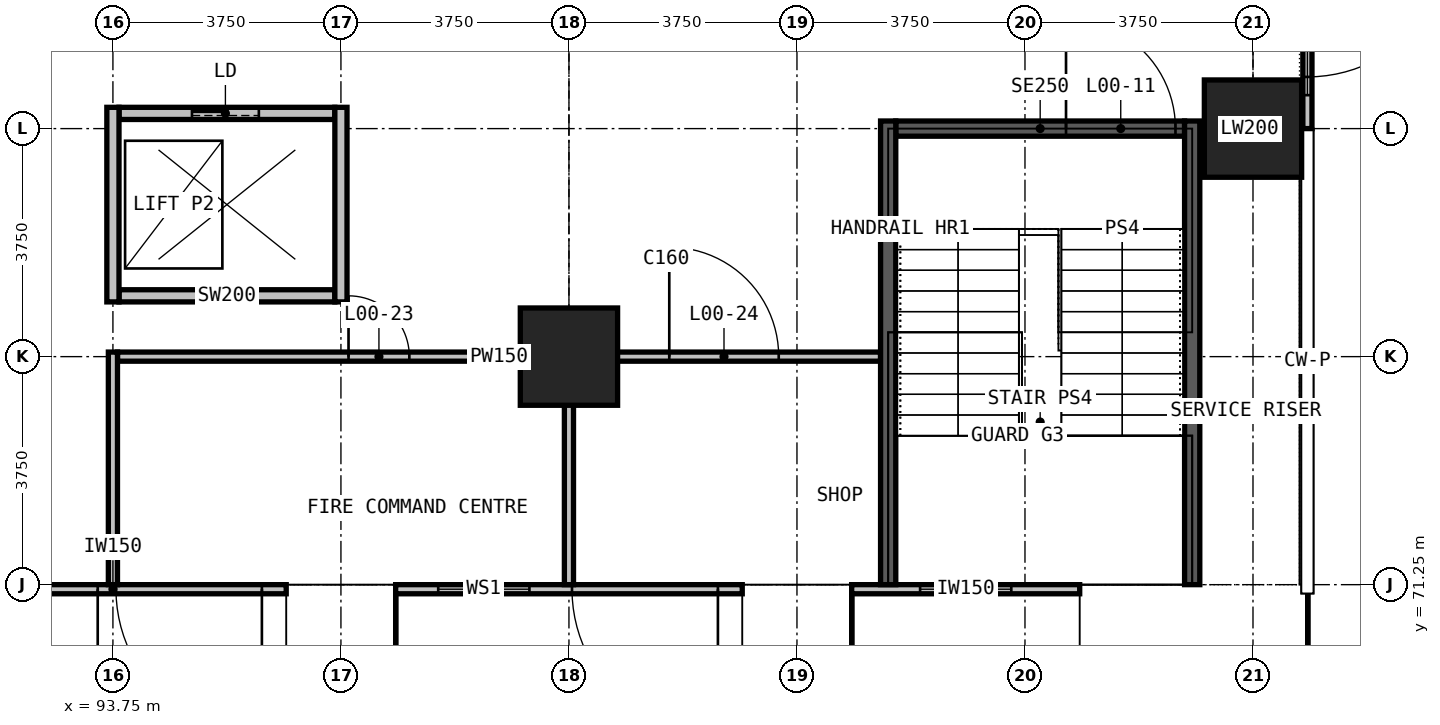
"""IFC4 building model, lengths in metres.
Left out: names, types, materials, properties, quantities, classifications, styles, units other than length and angle.
Written with IfcOpenShell. Run it as: python <this file> out.ifc"""

import sys

from ifc_helpers import new_model, si_unit, direction, frame, frame_2d, origin, origin_2d, place, context, subcontext, project, spatial, polyline, rectangle, outline, extrude, element, fill, save


model = new_model("IFC4")
c1 = context("Model", 3, precision=1e-05, world=origin(), true_north=direction((0.0, 1.0)))
c2 = subcontext(c1, "Body", "Model", "MODEL_VIEW")
j1 = project(units=[si_unit("LENGTHUNIT", "METRE"), si_unit("PLANEANGLEUNIT", "RADIAN")], contexts=[c1])
p1 = place(None, origin())
s1 = spatial("IfcSite", under=j1, at=p1, CompositionType="ELEMENT")
p2 = place(p1, origin())
s2 = spatial("IfcBuilding", under=s1, at=p2, CompositionType="ELEMENT")
p3 = place(p2, origin())
s3 = spatial("IfcBuildingStorey", under=s2, at=p3, CompositionType="ELEMENT", Elevation=0.0)
for number, where, z_axis, x_axis in (
    (1, (98.4, 71.25, 7.5), (1.0, 0.0, 0.0), (0.0, -1.0, 0.0)),
    (2, (105.9, 71.25, 7.5), (1.0, 0.0, 0.0), (0.0, -1.0, 0.0)),
):
    element("IfcWall", number, at=place(p3, frame(where, z_axis=z_axis, x_axis=x_axis)), inside=s3, PredefinedType="SHEAR", context=c2, shape_type="SweptSolid", body=[
        extrude(outline(polyline([(0.0, 0.0), (4.351, 0.0), (3.75, 1.5), (3.75, 7.5), (0.0, 7.5), (0.0, 0.0)])), origin(), (0.0, 0.0, -1.0), 1.8),
    ])
p4 = place(p3, frame((113.4, 71.25, 7.5), z_axis=(1.0, 0.0, 0.0), x_axis=(0.0, -1.0, 0.0)))
e3 = element("IfcWall", 3, at=p4, inside=s3, PredefinedType="SHEAR", context=c2, shape_type="SweptSolid", body=[
    extrude(outline(polyline([(0.0, 0.0), (4.351, 0.0), (3.75, 1.5), (3.75, 7.5), (0.0, 7.5), (0.0, 0.0)])), origin(), (0.0, 0.0, -1.0), 3.75),
])
for number, where, z_axis, x_axis in (
    (4, (101.25, 75.0, 0.0), (0.0, 0.0, 1.0), (1.0, 0.0, 0.0)),
    (5, (112.5, 78.75, 0.0), (0.0, 0.0, 1.0), (1.0, 0.0, 0.0)),
):
    element("IfcColumn", number, at=place(p3, frame(where, z_axis=z_axis, x_axis=x_axis)), inside=s3, PredefinedType="COLUMN", context=c2, shape_type="SweptSolid", body=[
        extrude(rectangle(XDim=1.6, YDim=1.6, at=origin_2d()), origin(), (0.0, 0.0, 1.0), 7.5),
    ])
p5 = place(p3, frame((113.395, 82.5, 0.0), z_axis=(0.0, 0.0, 1.0), x_axis=(0.0, -1.0, 0.0)))
e6 = element("IfcWall", 6, at=p5, inside=s3, PredefinedType="SOLIDWALL", context=c2, shape_type="SweptSolid", body=[
    extrude(rectangle(XDim=3.75, YDim=0.15, at=frame_2d((1.875, 0.0))), origin(), (0.0, 0.0, 1.0), 7.15),
])
p6 = place(p5, frame((0.5, 0.0, 0.0)))
e7 = element("IfcOpeningElement", 7, at=p6, cuts=e6, PredefinedType="OPENING", context=c2, shape_type="SweptSolid", body=[
    extrude(rectangle(XDim=2.4, YDim=2.7, at=frame_2d((1.2, 1.35))), frame((0.0, 0.085, 0.0), z_axis=(0.0, -1.0, 0.0), x_axis=(1.0, 0.0, 0.0)), (0.0, 0.0, 1.0), 0.17),
])
p7 = place(p5, frame((0.2, 0.0, 3.0)))
e8 = element("IfcOpeningElement", 8, at=p7, cuts=e6, PredefinedType="OPENING", context=c2, shape_type="SweptSolid", body=[
    extrude(rectangle(XDim=3.0, YDim=3.6, at=frame_2d((1.5, 1.8))), frame((0.0, 0.085, 0.0), z_axis=(0.0, -1.0, 0.0), x_axis=(1.0, 0.0, 0.0)), (0.0, 0.0, 1.0), 0.17),
])
p8 = place(p3, frame((96.6, 71.175, 0.0), z_axis=(0.0, 0.0, 1.0), x_axis=(-1.0, 0.0, 0.0)))
e9 = element("IfcWall", 9, at=p8, inside=s3, PredefinedType="SOLIDWALL", context=c2, shape_type="SweptSolid", body=[
    extrude(rectangle(XDim=5.7, YDim=0.15, at=frame_2d((2.85, 0.0))), origin(), (0.0, 0.0, 1.0), 7.15),
])
p9 = place(p8, frame((3.1, 0.0, 0.0)))
e10 = element("IfcOpeningElement", 10, at=p9, cuts=e9, PredefinedType="OPENING", context=c2, shape_type="SweptSolid", body=[
    extrude(rectangle(XDim=2.4, YDim=2.7, at=frame_2d((1.2, 1.35))), frame((0.0, 0.085, 0.0), z_axis=(0.0, -1.0, 0.0), x_axis=(1.0, 0.0, 0.0)), (0.0, 0.0, 1.0), 0.17),
])
p10 = place(p8, frame((0.4, 0.0, 0.0)))
e11 = element("IfcOpeningElement", 11, at=p10, cuts=e9, PredefinedType="OPENING", context=c2, shape_type="SweptSolid", body=[
    extrude(rectangle(XDim=2.4, YDim=2.7, at=frame_2d((1.2, 1.35))), frame((0.0, 0.085, 0.0), z_axis=(0.0, -1.0, 0.0), x_axis=(1.0, 0.0, 0.0)), (0.0, 0.0, 1.0), 0.17),
])
p11 = place(p3, frame((104.1, 71.175, 0.0), z_axis=(0.0, 0.0, 1.0), x_axis=(-1.0, 0.0, 0.0)))
e12 = element("IfcWall", 12, at=p11, inside=s3, PredefinedType="SOLIDWALL", context=c2, shape_type="SweptSolid", body=[
    extrude(rectangle(XDim=5.7, YDim=0.15, at=frame_2d((2.85, 0.0))), origin(), (0.0, 0.0, 1.0), 7.15),
])
p12 = place(p11, frame((0.4, 0.0, 0.0)))
e13 = element("IfcOpeningElement", 13, at=p12, cuts=e12, PredefinedType="OPENING", context=c2, shape_type="SweptSolid", body=[
    extrude(rectangle(XDim=2.4, YDim=2.7, at=frame_2d((1.2, 1.35))), frame((0.0, 0.085, 0.0), z_axis=(0.0, -1.0, 0.0), x_axis=(1.0, 0.0, 0.0)), (0.0, 0.0, 1.0), 0.17),
])
p13 = place(p11, frame((3.5, 0.0, 0.6)))
e14 = element("IfcOpeningElement", 14, at=p13, cuts=e12, PredefinedType="OPENING", context=c2, shape_type="SweptSolid", body=[
    extrude(rectangle(XDim=1.5, YDim=3.0, at=frame_2d((0.75, 1.5))), frame((0.0, 0.085, 0.0), z_axis=(0.0, -1.0, 0.0), x_axis=(1.0, 0.0, 0.0)), (0.0, 0.0, 1.0), 0.17),
])
p14 = place(p3, frame((109.65, 71.175, 0.0), z_axis=(0.0, 0.0, 1.0), x_axis=(-1.0, 0.0, 0.0)))
e15 = element("IfcWall", 15, at=p14, inside=s3, PredefinedType="SOLIDWALL", context=c2, shape_type="SweptSolid", body=[
    extrude(rectangle(XDim=3.75, YDim=0.15, at=frame_2d((1.875, 0.0))), origin(), (0.0, 0.0, 1.0), 7.15),
])
p15 = place(p14, frame((1.125, 0.0, 0.6)))
e16 = element("IfcOpeningElement", 16, at=p15, cuts=e15, PredefinedType="OPENING", context=c2, shape_type="SweptSolid", body=[
    extrude(rectangle(XDim=1.5, YDim=3.0, at=frame_2d((0.75, 1.5))), frame((0.0, 0.085, 0.0), z_axis=(0.0, -1.0, 0.0), x_axis=(1.0, 0.0, 0.0)), (0.0, 0.0, 1.0), 0.17),
])
p16 = place(p3, frame((111.625, 78.75, 0.0), z_axis=(0.0, 0.0, 1.0), x_axis=(1.0, 0.0, 0.0)))
e17 = element("IfcWall", 17, at=p16, inside=s3, PredefinedType="PARTITIONING", context=c2, shape_type="SweptSolid", body=[
    extrude(rectangle(XDim=1.64, YDim=0.2, at=frame_2d((0.82, 0.0))), origin(), (0.0, 0.0, 1.0), 7.15),
])
p17 = place(p3, frame((93.825, 75.0, 0.0), z_axis=(0.0, 0.0, 1.0), x_axis=(1.0, 0.0, 0.0)))
e18 = element("IfcWall", 18, at=p17, inside=s3, PredefinedType="PARTITIONING", context=c2, shape_type="SweptSolid", body=[
    extrude(rectangle(XDim=12.55, YDim=0.15, at=frame_2d((6.275, 0.0))), origin(), (0.0, 0.0, 1.0), 7.15),
])
p18 = place(p17, frame((3.8, 0.0, 0.0)))
e19 = element("IfcOpeningElement", 19, at=p18, cuts=e18, PredefinedType="OPENING", context=c2, shape_type="SweptSolid", body=[
    extrude(rectangle(XDim=1.0, YDim=2.2, at=frame_2d((0.5, 1.1))), frame((0.0, 0.085, 0.0), z_axis=(0.0, -1.0, 0.0), x_axis=(1.0, 0.0, 0.0)), (0.0, 0.0, 1.0), 0.17),
])
p19 = place(p17, frame((9.075, 0.0, 0.0)))
e20 = element("IfcOpeningElement", 20, at=p19, cuts=e18, PredefinedType="OPENING", context=c2, shape_type="SweptSolid", body=[
    extrude(rectangle(XDim=1.8, YDim=2.2, at=frame_2d((0.9, 1.1))), frame((0.0, 0.085, 0.0), z_axis=(0.0, -1.0, 0.0), x_axis=(1.0, 0.0, 0.0)), (0.0, 0.0, 1.0), 0.17),
])
p20 = place(p3, frame((93.75, 71.25, 0.0), z_axis=(0.0, 0.0, 1.0), x_axis=(0.0, 1.0, 0.0)))
e21 = element("IfcWall", 21, at=p20, inside=s3, PredefinedType="PARTITIONING", context=c2, shape_type="SweptSolid", body=[
    extrude(rectangle(XDim=3.825, YDim=0.15, at=frame_2d((1.913, 0.0))), origin(), (0.0, 0.0, 1.0), 7.15),
])
p21 = place(p3, frame((101.25, 71.25, 0.0), z_axis=(0.0, 0.0, 1.0), x_axis=(0.0, 1.0, 0.0)))
e22 = element("IfcWall", 22, at=p21, inside=s3, PredefinedType="PARTITIONING", context=c2, shape_type="SweptSolid", body=[
    extrude(rectangle(XDim=3.675, YDim=0.15, at=frame_2d((1.837, 0.0))), origin(), (0.0, 0.0, 1.0), 7.15),
])
p22 = place(p3, frame((93.85, 76.0, 0.0), z_axis=(0.0, 0.0, 1.0), x_axis=(1.0, 0.0, 0.0)))
e23 = element("IfcWall", 23, at=p22, inside=s3, PredefinedType="PARTITIONING", context=c2, shape_type="SweptSolid", body=[
    extrude(rectangle(XDim=3.55, YDim=0.2, at=frame_2d((1.775, 0.0))), origin(), (0.0, 0.0, 1.0), 7.15),
])
p23 = place(p3, frame((93.85, 79.0, 0.0), z_axis=(0.0, 0.0, 1.0), x_axis=(1.0, 0.0, 0.0)))
e24 = element("IfcWall", 24, at=p23, inside=s3, PredefinedType="PARTITIONING", context=c2, shape_type="SweptSolid", body=[
    extrude(rectangle(XDim=3.55, YDim=0.2, at=frame_2d((1.775, 0.0))), origin(), (0.0, 0.0, 1.0), 7.15),
])
p24 = place(p23, frame((1.2, 0.0, 0.0)))
e25 = element("IfcOpeningElement", 25, at=p24, cuts=e24, PredefinedType="OPENING", context=c2, shape_type="SweptSolid", body=[
    extrude(rectangle(XDim=1.1, YDim=2.2, at=frame_2d((0.55, 1.1))), frame((0.0, 0.11, 0.0), z_axis=(0.0, -1.0, 0.0), x_axis=(1.0, 0.0, 0.0)), (0.0, 0.0, 1.0), 0.22),
])
for number, where, z_axis, x_axis in (
    (26, (93.75, 75.9, 0.0), (0.0, 0.0, 1.0), (0.0, 1.0, 0.0)),
    (27, (97.5, 75.9, 0.0), (0.0, 0.0, 1.0), (0.0, 1.0, 0.0)),
):
    element("IfcWall", number, at=place(p3, frame(where, z_axis=z_axis, x_axis=x_axis)), inside=s3, PredefinedType="PARTITIONING", context=c2, shape_type="SweptSolid", body=[
        extrude(rectangle(XDim=3.2, YDim=0.2, at=frame_2d((1.6, 0.0))), origin(), (0.0, 0.0, 1.0), 7.15),
    ])
p25 = place(p3, frame((106.625, 78.75, 0.0), z_axis=(0.0, 0.0, 1.0), x_axis=(1.0, 0.0, 0.0)))
e28 = element("IfcWall", 28, at=p25, inside=s3, PredefinedType="PARTITIONING", context=c2, shape_type="SweptSolid", body=[
    extrude(rectangle(XDim=4.75, YDim=0.25, at=frame_2d((2.375, 0.0))), origin(), (0.0, 0.0, 1.0), 7.15),
])
p26 = place(p25, frame((2.8, 0.0, 0.0)))
e29 = element("IfcOpeningElement", 29, at=p26, cuts=e28, PredefinedType="OPENING", context=c2, shape_type="SweptSolid", body=[
    extrude(rectangle(XDim=1.8, YDim=2.2, at=frame_2d((0.9, 1.1))), frame((0.0, 0.135, 0.0), z_axis=(0.0, -1.0, 0.0), x_axis=(1.0, 0.0, 0.0)), (0.0, 0.0, 1.0), 0.27),
])
for number, where, z_axis, x_axis in (
    (30, (106.5, 71.25, 0.0), (0.0, 0.0, 1.0), (0.0, 1.0, 0.0)),
    (31, (111.5, 71.25, 0.0), (0.0, 0.0, 1.0), (0.0, 1.0, 0.0)),
):
    element("IfcWall", number, at=place(p3, frame(where, z_axis=z_axis, x_axis=x_axis)), inside=s3, PredefinedType="PARTITIONING", context=c2, shape_type="SweptSolid", body=[
        extrude(rectangle(XDim=7.625, YDim=0.25, at=frame_2d((3.812, 0.0))), origin(), (0.0, 0.0, 1.0), 7.15),
    ])
p27 = place(p6, origin())
e32 = element("IfcDoor", 32, at=p27, inside=s3, OperationType="DOUBLE_DOOR_SINGLE_SWING", PredefinedType="DOOR", context=c2, shape_type="SweptSolid", body=[
    extrude(rectangle(XDim=2.4, YDim=2.7, at=frame_2d((1.2, 1.35))), frame((0.0, 0.025, 0.0), z_axis=(0.0, -1.0, 0.0), x_axis=(1.0, 0.0, 0.0)), (0.0, 0.0, 1.0), 0.05),
])
fill(e7, e32)
p28 = place(p7, origin())
e33 = element("IfcWindow", 33, at=p28, inside=s3, PartitioningType="SINGLE_PANEL", PredefinedType="WINDOW", context=c2, shape_type="SweptSolid", body=[
    extrude(rectangle(XDim=3.0, YDim=3.6, at=frame_2d((1.5, 1.8))), frame((0.0, 0.03, 0.0), z_axis=(0.0, -1.0, 0.0), x_axis=(1.0, 0.0, 0.0)), (0.0, 0.0, 1.0), 0.06),
])
fill(e8, e33)
p29 = place(p9, origin())
e34 = element("IfcDoor", 34, at=p29, inside=s3, OperationType="DOUBLE_DOOR_SINGLE_SWING", PredefinedType="DOOR", context=c2, shape_type="SweptSolid", body=[
    extrude(rectangle(XDim=2.4, YDim=2.7, at=frame_2d((1.2, 1.35))), frame((0.0, 0.025, 0.0), z_axis=(0.0, -1.0, 0.0), x_axis=(1.0, 0.0, 0.0)), (0.0, 0.0, 1.0), 0.05),
])
fill(e10, e34)
p30 = place(p10, origin())
e35 = element("IfcDoor", 35, at=p30, inside=s3, OperationType="DOUBLE_DOOR_SINGLE_SWING", PredefinedType="DOOR", context=c2, shape_type="SweptSolid", body=[
    extrude(rectangle(XDim=2.4, YDim=2.7, at=frame_2d((1.2, 1.35))), frame((0.0, 0.025, 0.0), z_axis=(0.0, -1.0, 0.0), x_axis=(1.0, 0.0, 0.0)), (0.0, 0.0, 1.0), 0.05),
])
fill(e11, e35)
p31 = place(p12, origin())
e36 = element("IfcDoor", 36, at=p31, inside=s3, OperationType="DOUBLE_DOOR_SINGLE_SWING", PredefinedType="DOOR", context=c2, shape_type="SweptSolid", body=[
    extrude(rectangle(XDim=2.4, YDim=2.7, at=frame_2d((1.2, 1.35))), frame((0.0, 0.025, 0.0), z_axis=(0.0, -1.0, 0.0), x_axis=(1.0, 0.0, 0.0)), (0.0, 0.0, 1.0), 0.05),
])
fill(e13, e36)
p32 = place(p13, origin())
e37 = element("IfcWindow", 37, at=p32, inside=s3, PartitioningType="SINGLE_PANEL", PredefinedType="WINDOW", context=c2, shape_type="SweptSolid", body=[
    extrude(rectangle(XDim=1.5, YDim=3.0, at=frame_2d((0.75, 1.5))), frame((0.0, 0.03, 0.0), z_axis=(0.0, -1.0, 0.0), x_axis=(1.0, 0.0, 0.0)), (0.0, 0.0, 1.0), 0.06),
])
fill(e14, e37)
p33 = place(p15, origin())
e38 = element("IfcWindow", 38, at=p33, inside=s3, PartitioningType="SINGLE_PANEL", PredefinedType="WINDOW", context=c2, shape_type="SweptSolid", body=[
    extrude(rectangle(XDim=1.5, YDim=3.0, at=frame_2d((0.75, 1.5))), frame((0.0, 0.03, 0.0), z_axis=(0.0, -1.0, 0.0), x_axis=(1.0, 0.0, 0.0)), (0.0, 0.0, 1.0), 0.06),
])
fill(e16, e38)
p34 = place(p26, origin())
e39 = element("IfcDoor", 39, at=p34, inside=s3, OperationType="DOUBLE_DOOR_SINGLE_SWING", PredefinedType="DOOR", context=c2, shape_type="SweptSolid", body=[
    extrude(rectangle(XDim=1.8, YDim=2.2, at=frame_2d((0.9, 1.1))), frame((0.0, 0.025, 0.0), z_axis=(0.0, -1.0, 0.0), x_axis=(1.0, 0.0, 0.0)), (0.0, 0.0, 1.0), 0.05),
])
fill(e29, e39)
p35 = place(p24, origin())
e40 = element("IfcDoor", 40, at=p35, inside=s3, OperationType="DOUBLE_DOOR_SLIDING", PredefinedType="DOOR", context=c2, shape_type="SweptSolid", body=[
    extrude(rectangle(XDim=1.1, YDim=2.2, at=frame_2d((0.55, 1.1))), frame((0.0, 0.025, 0.0), z_axis=(0.0, -1.0, 0.0), x_axis=(1.0, 0.0, 0.0)), (0.0, 0.0, 1.0), 0.05),
])
fill(e25, e40)
p36 = place(p18, origin())
e41 = element("IfcDoor", 41, at=p36, inside=s3, OperationType="SINGLE_SWING_LEFT", PredefinedType="DOOR", context=c2, shape_type="SweptSolid", body=[
    extrude(rectangle(XDim=1.0, YDim=2.2, at=frame_2d((0.5, 1.1))), frame((0.0, 0.025, 0.0), z_axis=(0.0, -1.0, 0.0), x_axis=(1.0, 0.0, 0.0)), (0.0, 0.0, 1.0), 0.05),
])
fill(e19, e41)
p37 = place(p19, origin())
e42 = element("IfcDoor", 42, at=p37, inside=s3, OperationType="DOUBLE_DOOR_SINGLE_SWING", PredefinedType="DOOR", context=c2, shape_type="SweptSolid", body=[
    extrude(rectangle(XDim=1.8, YDim=2.2, at=frame_2d((0.9, 1.1))), frame((0.0, 0.025, 0.0), z_axis=(0.0, -1.0, 0.0), x_axis=(1.0, 0.0, 0.0)), (0.0, 0.0, 1.0), 0.05),
])
fill(e20, e42)
save(model, sys.argv[1])
